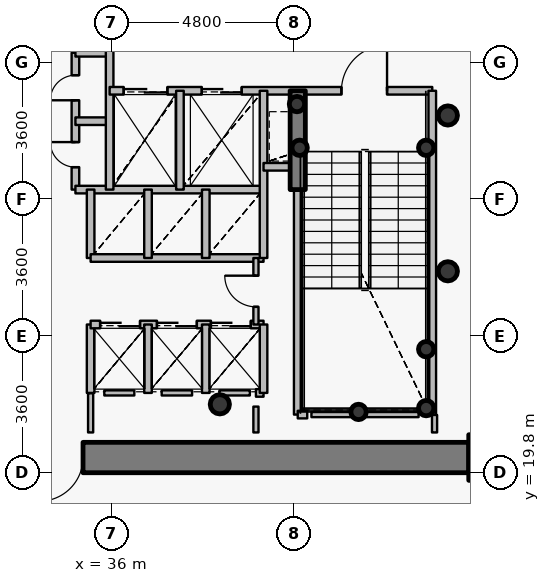
"""IFC4 building model, lengths in metres.
Left out: names, types, materials, properties, quantities, classifications, styles, units other than length and angle.
Written with IfcOpenShell. Run it as: python <this file> out.ifc"""

import sys

from ifc_helpers import new_model, si_unit, direction, frame, frame_2d, origin, origin_2d, place, context, subcontext, project, spatial, rectangle, hollow_circle, extrude, source, transform, mapped, element, fill, save


model = new_model("IFC4")
c1 = context("Model", 3, precision=1e-05, world=origin(), true_north=direction((0.0, 1.0)))
c2 = subcontext(c1, "Body", "Model", "MODEL_VIEW")
j1 = project(units=[si_unit("LENGTHUNIT", "METRE"), si_unit("PLANEANGLEUNIT", "RADIAN")], contexts=[c1])
p1 = place(None, origin())
s1 = spatial("IfcSite", under=j1, at=p1, CompositionType="ELEMENT")
p2 = place(p1, origin())
s2 = spatial("IfcBuilding", under=s1, at=p2, CompositionType="ELEMENT")
p3 = place(p2, frame((0.0, 0.0, 138.45)))
s3 = spatial("IfcBuildingStorey", under=s2, at=p3, CompositionType="ELEMENT", Elevation=138.45)
p4 = place(p3, frame((46.0, 20.2, 0.0), z_axis=(0.0, 0.0, 1.0), x_axis=(1.0, 0.0, 0.0)))
e1 = element("IfcColumn", 1, at=p4, inside=s3, PredefinedType="COLUMN", context=c2, shape_type="SweptSolid", body=[
    extrude(rectangle(XDim=1.2, YDim=1.2, at=origin_2d()), origin(), (0.0, 0.0, 1.0), 3.75),
])
p5 = place(p3, frame((38.85, 21.6, 0.0), z_axis=(0.0, 0.0, 1.0), x_axis=(1.0, 0.0, 0.0)))
e2 = element("IfcColumn", 2, at=p5, inside=s3, PredefinedType="COLUMN", context=c2, shape_type="SweptSolid", body=[
    extrude(hollow_circle(Radius=0.254, WallThickness=0.02, at=origin_2d()), origin(), (0.0, 0.0, 1.0), 3.75),
])
for number, where, z_axis, x_axis in (
    (3, (44.28, 21.5, 0.0), (0.0, 0.0, 1.0), (1.0, 0.0, 0.0)),
    (4, (44.28, 23.05, 0.0), (0.0, 0.0, 1.0), (1.0, 0.0, 0.0)),
    (5, (42.5, 21.4, 0.0), (0.0, 0.0, 1.0), (1.0, 0.0, 0.0)),
    (6, (40.95, 28.35, 0.0), (0.0, 0.0, 1.0), (1.0, 0.0, 0.0)),
    (7, (44.28, 28.35, 0.0), (0.0, 0.0, 1.0), (1.0, 0.0, 0.0)),
    (8, (40.88, 29.5, 0.0), (0.0, 0.0, 1.0), (1.0, 0.0, 0.0)),
):
    element("IfcColumn", number, at=place(p3, frame(where, z_axis=z_axis, x_axis=x_axis)), inside=s3, PredefinedType="COLUMN", context=c2, shape_type="SweptSolid", body=[
        extrude(hollow_circle(Radius=0.203, WallThickness=0.016, at=origin_2d()), origin(), (0.0, 0.0, 1.0), 3.75),
    ])
p6 = place(p3, frame((45.4, 20.2, 0.0), z_axis=(0.0, 0.0, 1.0), x_axis=(-1.0, 0.0, 0.0)))
e9 = element("IfcWall", 9, at=p6, inside=s3, PredefinedType="SHEAR", context=c2, shape_type="SweptSolid", body=[
    extrude(rectangle(XDim=18.8, YDim=0.8, at=frame_2d((9.4, 0.0))), origin(), (0.0, 0.0, 1.0), 2.95),
])
p7 = place(p6, frame((10.15, 0.0, 0.0)))
e10 = element("IfcOpeningElement", 10, at=p7, cuts=e9, PredefinedType="OPENING", context=c2, shape_type="SweptSolid", body=[
    extrude(rectangle(XDim=1.15, YDim=2.15, at=origin_2d()), frame((0.575, 0.41, 1.075), z_axis=(0.0, -1.0, 0.0), x_axis=(1.0, 0.0, 0.0)), (0.0, 0.0, 1.0), 0.82),
])
p8 = place(p3, frame((40.9, 27.25, 0.0), z_axis=(0.0, 0.0, 1.0), x_axis=(0.0, 1.0, 0.0)))
e11 = element("IfcWall", 11, at=p8, inside=s3, PredefinedType="SHEAR", context=c2, shape_type="SweptSolid", body=[
    extrude(rectangle(XDim=2.6, YDim=0.4, at=frame_2d((1.3, 0.0))), origin(), (0.0, 0.0, 1.0), 3.1),
])
for number, where, z_axis, x_axis in (
    (12, (44.85, 25.1, 0.0), (0.0, 0.0, 1.0), (1.0, 0.0, 0.0)),
    (13, (44.85, 29.2, 0.0), (0.0, 0.0, 1.0), (1.0, 0.0, 0.0)),
):
    element("IfcColumn", number, at=place(p3, frame(where, z_axis=z_axis, x_axis=x_axis)), inside=s3, PredefinedType="COLUMN", context=c2, shape_type="SweptSolid", body=[
        extrude(hollow_circle(Radius=0.254, WallThickness=0.02, at=origin_2d()), origin(), (0.0, 0.0, 1.0), 3.75),
    ])
p9 = place(p3, frame((35.05, 27.25, 0.0), z_axis=(0.0, 0.0, 1.0), x_axis=(0.0, 1.0, 0.0)))
e14 = element("IfcWall", 14, at=p9, inside=s3, PredefinedType="PARTITIONING", context=c2, shape_type="SweptSolid", body=[
    extrude(rectangle(XDim=3.6, YDim=0.2, at=frame_2d((1.8, 0.0))), origin(), (0.0, 0.0, 1.0), 3.5),
])
p10 = place(p9, frame((0.59, 0.0, 0.0)))
e15 = element("IfcOpeningElement", 15, at=p10, cuts=e14, PredefinedType="OPENING", context=c2, shape_type="SweptSolid", body=[
    extrude(rectangle(XDim=0.66, YDim=2.05, at=origin_2d()), frame((0.33, 0.11, 1.025), z_axis=(0.0, -1.0, 0.0), x_axis=(1.0, 0.0, 0.0)), (0.0, 0.0, 1.0), 0.22),
])
p11 = place(p9, frame((2.35, 0.0, 0.0)))
e16 = element("IfcOpeningElement", 16, at=p11, cuts=e14, PredefinedType="OPENING", context=c2, shape_type="SweptSolid", body=[
    extrude(rectangle(XDim=0.66, YDim=2.05, at=origin_2d()), frame((0.33, 0.11, 1.025), z_axis=(0.0, -1.0, 0.0), x_axis=(1.0, 0.0, 0.0)), (0.0, 0.0, 1.0), 0.22),
])
p12 = place(p3, frame((35.05, 27.25, 0.0), z_axis=(0.0, 0.0, 1.0), x_axis=(1.0, 0.0, 0.0)))
e17 = element("IfcWall", 17, at=p12, inside=s3, PredefinedType="PARTITIONING", context=c2, shape_type="SweptSolid", body=[
    extrude(rectangle(XDim=4.95, YDim=0.2, at=frame_2d((2.475, 0.0))), origin(), (0.0, 0.0, 1.0), 3.085),
])
for number, where, z_axis, x_axis in (
    (18, (35.05, 29.05, 0.0), (0.0, 0.0, 1.0), (1.0, 0.0, 0.0)),
    (19, (35.05, 30.85, 0.0), (0.0, 0.0, 1.0), (1.0, 0.0, 0.0)),
):
    element("IfcWall", number, at=place(p3, frame(where, z_axis=z_axis, x_axis=x_axis)), inside=s3, PredefinedType="PARTITIONING", context=c2, shape_type="SweptSolid", body=[
        extrude(rectangle(XDim=0.9, YDim=0.2, at=frame_2d((0.45, 0.0))), origin(), (0.0, 0.0, 1.0), 3.5),
    ])
p13 = place(p3, frame((35.45, 21.9, 0.0), z_axis=(0.0, 0.0, 1.0), x_axis=(0.0, 1.0, 0.0)))
e20 = element("IfcWall", 20, at=p13, inside=s3, PredefinedType="PARTITIONING", context=c2, shape_type="SweptSolid", body=[
    extrude(rectangle(XDim=1.8, YDim=0.2, at=frame_2d((0.9, 0.0))), origin(), (0.0, 0.0, 1.0), 3.5),
])
p14 = place(p3, frame((35.45, 23.7, 0.0), z_axis=(0.0, 0.0, 1.0), x_axis=(1.0, 0.0, 0.0)))
e21 = element("IfcWall", 21, at=p14, inside=s3, PredefinedType="PARTITIONING", context=c2, shape_type="SweptSolid", body=[
    extrude(rectangle(XDim=4.55, YDim=0.2, at=frame_2d((2.275, 0.0))), origin(), (0.0, 0.0, 1.0), 3.085),
])
p15 = place(p14, frame((0.25, 0.0, 0.0)))
e22 = element("IfcOpeningElement", 22, at=p15, cuts=e21, PredefinedType="OPENING", context=c2, shape_type="SweptSolid", body=[
    extrude(rectangle(XDim=1.05, YDim=2.15, at=origin_2d()), frame((0.525, 0.11, 1.075), z_axis=(0.0, -1.0, 0.0), x_axis=(1.0, 0.0, 0.0)), (0.0, 0.0, 1.0), 0.22),
])
p16 = place(p14, frame((1.745, 0.0, 0.0)))
e23 = element("IfcOpeningElement", 23, at=p16, cuts=e21, PredefinedType="OPENING", context=c2, shape_type="SweptSolid", body=[
    extrude(rectangle(XDim=1.05, YDim=2.15, at=origin_2d()), frame((0.525, 0.11, 1.075), z_axis=(0.0, -1.0, 0.0), x_axis=(1.0, 0.0, 0.0)), (0.0, 0.0, 1.0), 0.22),
])
p17 = place(p14, frame((3.165, 0.0, 0.0)))
e24 = element("IfcOpeningElement", 24, at=p17, cuts=e21, PredefinedType="OPENING", context=c2, shape_type="SweptSolid", body=[
    extrude(rectangle(XDim=1.05, YDim=2.15, at=origin_2d()), frame((0.525, 0.11, 1.075), z_axis=(0.0, -1.0, 0.0), x_axis=(1.0, 0.0, 0.0)), (0.0, 0.0, 1.0), 0.22),
])
p18 = place(p3, frame((35.45, 25.45, 0.0), z_axis=(0.0, 0.0, 1.0), x_axis=(0.0, 1.0, 0.0)))
e25 = element("IfcWall", 25, at=p18, inside=s3, PredefinedType="PARTITIONING", context=c2, shape_type="SweptSolid", body=[
    extrude(rectangle(XDim=1.8, YDim=0.2, at=frame_2d((0.9, 0.0))), origin(), (0.0, 0.0, 1.0), 3.5),
])
p19 = place(p3, frame((35.45, 25.45, 0.0), z_axis=(0.0, 0.0, 1.0), x_axis=(1.0, 0.0, 0.0)))
e26 = element("IfcWall", 26, at=p19, inside=s3, PredefinedType="PARTITIONING", context=c2, shape_type="SweptSolid", body=[
    extrude(rectangle(XDim=4.55, YDim=0.2, at=frame_2d((2.275, 0.0))), origin(), (0.0, 0.0, 1.0), 3.085),
])
p20 = place(p3, frame((35.95, 27.25, 0.0), z_axis=(0.0, 0.0, 1.0), x_axis=(0.0, 1.0, 0.0)))
e27 = element("IfcWall", 27, at=p20, inside=s3, PredefinedType="PARTITIONING", context=c2, shape_type="SweptSolid", body=[
    extrude(rectangle(XDim=3.8, YDim=0.2, at=frame_2d((1.9, 0.0))), origin(), (0.0, 0.0, 1.0), 3.5),
])
p21 = place(p3, frame((35.95, 29.85, 0.0), z_axis=(0.0, 0.0, 1.0), x_axis=(1.0, 0.0, 0.0)))
e28 = element("IfcWall", 28, at=p21, inside=s3, PredefinedType="PARTITIONING", context=c2, shape_type="SweptSolid", body=[
    extrude(rectangle(XDim=8.49, YDim=0.2, at=frame_2d((4.245, 0.0))), origin(), (0.0, 0.0, 1.0), 3.085),
])
p22 = place(p21, frame((6.1, 0.0, 0.0)))
e29 = element("IfcOpeningElement", 29, at=p22, cuts=e28, PredefinedType="OPENING", context=c2, shape_type="SweptSolid", body=[
    extrude(rectangle(XDim=1.2, YDim=2.15, at=origin_2d()), frame((0.6, 0.11, 1.075), z_axis=(0.0, -1.0, 0.0), x_axis=(1.0, 0.0, 0.0)), (0.0, 0.0, 1.0), 0.22),
])
p23 = place(p21, frame((0.37, 0.0, 0.0)))
e30 = element("IfcOpeningElement", 30, at=p23, cuts=e28, PredefinedType="OPENING", context=c2, shape_type="SweptSolid", body=[
    extrude(rectangle(XDim=1.15, YDim=2.15, at=origin_2d()), frame((0.575, 0.11, 1.075), z_axis=(0.0, -1.0, 0.0), x_axis=(1.0, 0.0, 0.0)), (0.0, 0.0, 1.0), 0.22),
])
p24 = place(p21, frame((2.425, 0.0, 0.0)))
e31 = element("IfcOpeningElement", 31, at=p24, cuts=e28, PredefinedType="OPENING", context=c2, shape_type="SweptSolid", body=[
    extrude(rectangle(XDim=1.05, YDim=2.15, at=origin_2d()), frame((0.525, 0.11, 1.075), z_axis=(0.0, -1.0, 0.0), x_axis=(1.0, 0.0, 0.0)), (0.0, 0.0, 1.0), 0.22),
])
for number, where, z_axis, x_axis in (
    (32, (36.96, 21.9, 0.0), (0.0, 0.0, 1.0), (0.0, 1.0, 0.0)),
    (33, (36.96, 25.45, 0.0), (0.0, 0.0, 1.0), (0.0, 1.0, 0.0)),
):
    element("IfcWall", number, at=place(p3, frame(where, z_axis=z_axis, x_axis=x_axis)), inside=s3, PredefinedType="PARTITIONING", context=c2, shape_type="SweptSolid", body=[
        extrude(rectangle(XDim=1.8, YDim=0.2, at=frame_2d((0.9, 0.0))), origin(), (0.0, 0.0, 1.0), 3.5),
    ])
p25 = place(p3, frame((37.8, 27.25, 0.0), z_axis=(0.0, 0.0, 1.0), x_axis=(0.0, 1.0, 0.0)))
e34 = element("IfcWall", 34, at=p25, inside=s3, PredefinedType="PARTITIONING", context=c2, shape_type="SweptSolid", body=[
    extrude(rectangle(XDim=2.6, YDim=0.2, at=frame_2d((1.3, 0.0))), origin(), (0.0, 0.0, 1.0), 3.5),
])
for number, where, z_axis, x_axis in (
    (35, (38.48, 21.9, 0.0), (0.0, 0.0, 1.0), (0.0, 1.0, 0.0)),
    (36, (38.48, 25.45, 0.0), (0.0, 0.0, 1.0), (0.0, 1.0, 0.0)),
):
    element("IfcWall", number, at=place(p3, frame(where, z_axis=z_axis, x_axis=x_axis)), inside=s3, PredefinedType="PARTITIONING", context=c2, shape_type="SweptSolid", body=[
        extrude(rectangle(XDim=1.8, YDim=0.2, at=frame_2d((0.9, 0.0))), origin(), (0.0, 0.0, 1.0), 3.5),
    ])
p26 = place(p3, frame((39.8, 21.9, 0.0), z_axis=(0.0, 0.0, 1.0), x_axis=(1.0, 0.0, 0.0)))
e37 = element("IfcWall", 37, at=p26, inside=s3, PredefinedType="PARTITIONING", context=c2, shape_type="SweptSolid", body=[
    extrude(rectangle(XDim=0.2, YDim=0.2, at=frame_2d((0.1, 0.0))), origin(), (0.0, 0.0, 1.0), 3.5),
])
p27 = place(p3, frame((39.8, 23.7, 0.0), z_axis=(0.0, 0.0, 1.0), x_axis=(0.0, 1.0, 0.0)))
e38 = element("IfcWall", 38, at=p27, inside=s3, PredefinedType="PARTITIONING", context=c2, shape_type="SweptSolid", body=[
    extrude(rectangle(XDim=1.75, YDim=0.135, at=frame_2d((0.875, 0.0))), origin(), (0.0, 0.0, 1.0), 3.5),
])
p28 = place(p27, frame((0.465, 0.0, 0.0)))
e39 = element("IfcOpeningElement", 39, at=p28, cuts=e38, PredefinedType="OPENING", context=c2, shape_type="SweptSolid", body=[
    extrude(rectangle(XDim=0.82, YDim=2.1, at=origin_2d()), frame((0.41, 0.078, 1.05), z_axis=(0.0, -1.0, 0.0), x_axis=(1.0, 0.0, 0.0)), (0.0, 0.0, 1.0), 0.155),
])
p29 = place(p3, frame((40.0, 21.9, 0.0), z_axis=(0.0, 0.0, 1.0), x_axis=(0.0, 1.0, 0.0)))
e40 = element("IfcWall", 40, at=p29, inside=s3, PredefinedType="PARTITIONING", context=c2, shape_type="SweptSolid", body=[
    extrude(rectangle(XDim=1.8, YDim=0.2, at=frame_2d((0.9, 0.0))), origin(), (0.0, 0.0, 1.0), 3.5),
])
p30 = place(p3, frame((40.0, 25.45, 0.0), z_axis=(0.0, 0.0, 1.0), x_axis=(0.0, 1.0, 0.0)))
e41 = element("IfcWall", 41, at=p30, inside=s3, PredefinedType="PARTITIONING", context=c2, shape_type="SweptSolid", body=[
    extrude(rectangle(XDim=4.4, YDim=0.2, at=frame_2d((2.2, 0.0))), origin(), (0.0, 0.0, 1.0), 3.5),
])
p31 = place(p3, frame((40.0, 27.85, 0.0), z_axis=(0.0, 0.0, 1.0), x_axis=(1.0, 0.0, 0.0)))
e42 = element("IfcWall", 42, at=p31, inside=s3, PredefinedType="PARTITIONING", context=c2, shape_type="SweptSolid", body=[
    extrude(rectangle(XDim=0.9, YDim=0.2, at=frame_2d((0.45, 0.0))), origin(), (0.0, 0.0, 1.0), 3.5),
])
p32 = place(p3, frame((40.9, 21.33, 0.0), z_axis=(0.0, 0.0, 1.0), x_axis=(0.0, 1.0, 0.0)))
e43 = element("IfcWall", 43, at=p32, inside=s3, PredefinedType="PARTITIONING", context=c2, shape_type="SweptSolid", body=[
    extrude(rectangle(XDim=5.91, YDim=0.2, at=frame_2d((2.955, 0.0))), origin(), (0.0, 0.0, 1.0), 3.035),
])
p33 = place(p3, frame((40.9, 21.33, 0.0), z_axis=(0.0, 0.0, 1.0), x_axis=(1.0, 0.0, 0.0)))
e44 = element("IfcWall", 44, at=p33, inside=s3, PredefinedType="PARTITIONING", context=c2, shape_type="SweptSolid", body=[
    extrude(rectangle(XDim=0.25, YDim=0.2, at=frame_2d((0.125, 0.0))), origin(), (0.0, 0.0, 1.0), 3.035),
])
p34 = place(p3, frame((44.44, 21.33, 0.0), z_axis=(0.0, 0.0, 1.0), x_axis=(0.0, 1.0, 0.0)))
e45 = element("IfcWall", 45, at=p34, inside=s3, PredefinedType="PARTITIONING", context=c2, shape_type="SweptSolid", body=[
    extrude(rectangle(XDim=8.52, YDim=0.2, at=frame_2d((4.26, 0.0))), origin(), (0.0, 0.0, 1.0), 3.5),
])
p35 = place(p3, frame((44.08, 21.33, 0.0), z_axis=(0.0, 0.0, 1.0), x_axis=(-1.0, 0.0, 0.0)))
e46 = element("IfcWall", 46, at=p35, inside=s3, PredefinedType="PARTITIONING", context=c2, shape_type="SweptSolid", body=[
    extrude(rectangle(XDim=2.82, YDim=0.135, at=frame_2d((1.41, 0.0))), origin(), (0.0, 0.0, 1.0), 3.035),
])
p36 = place(p3, frame((36.6, 21.9, 0.0), z_axis=(0.0, 0.0, 1.0), x_axis=(-1.0, 0.0, 0.0)))
e47 = element("IfcWall", 47, at=p36, inside=s3, PredefinedType="PARTITIONING", context=c2, shape_type="SweptSolid", body=[
    extrude(rectangle(XDim=0.79, YDim=0.135, at=frame_2d((0.395, 0.0))), origin(), (0.0, 0.0, 1.0), 3.5),
])
p37 = place(p3, frame((38.12, 21.9, 0.0), z_axis=(0.0, 0.0, 1.0), x_axis=(-1.0, 0.0, 0.0)))
e48 = element("IfcWall", 48, at=p37, inside=s3, PredefinedType="PARTITIONING", context=c2, shape_type="SweptSolid", body=[
    extrude(rectangle(XDim=0.8, YDim=0.135, at=frame_2d((0.4, 0.0))), origin(), (0.0, 0.0, 1.0), 3.5),
])
p38 = place(p3, frame((39.64, 21.9, 0.0), z_axis=(0.0, 0.0, 1.0), x_axis=(-1.0, 0.0, 0.0)))
e49 = element("IfcWall", 49, at=p38, inside=s3, PredefinedType="PARTITIONING", context=c2, shape_type="SweptSolid", body=[
    extrude(rectangle(XDim=0.8, YDim=0.135, at=frame_2d((0.4, 0.0))), origin(), (0.0, 0.0, 1.0), 3.085),
])
p39 = place(p3, frame((39.8, 20.86, 0.0), z_axis=(0.0, 0.0, 1.0), x_axis=(0.0, 1.0, 0.0)))
e50 = element("IfcWall", 50, at=p39, inside=s3, PredefinedType="PARTITIONING", context=c2, shape_type="SweptSolid", body=[
    extrude(rectangle(XDim=0.68, YDim=0.135, at=frame_2d((0.34, 0.0))), origin(), (0.0, 0.0, 1.0), 3.035),
])
p40 = place(p3, frame((44.5, 20.86, 0.0), z_axis=(0.0, 0.0, 1.0), x_axis=(0.0, 1.0, 0.0)))
e51 = element("IfcWall", 51, at=p40, inside=s3, PredefinedType="PARTITIONING", context=c2, shape_type="SweptSolid", body=[
    extrude(rectangle(XDim=0.46, YDim=0.135, at=frame_2d((0.23, 0.0))), origin(), (0.0, 0.0, 1.0), 3.5),
])
p41 = place(p3, frame((35.45, 21.89, 0.0), z_axis=(0.0, 0.0, 1.0), x_axis=(0.0, -1.0, 0.0)))
e52 = element("IfcWall", 52, at=p41, inside=s3, PredefinedType="PARTITIONING", context=c2, shape_type="SweptSolid", body=[
    extrude(rectangle(XDim=1.03, YDim=0.135, at=frame_2d((0.515, 0.0))), origin(), (0.0, 0.0, 1.0), 3.085),
])
p42 = place(p3, frame((45.41, 19.8, 0.0), z_axis=(0.0, 0.0, 1.0), x_axis=(1.0, 0.0, 0.0)))
e53 = element("IfcWall", 53, at=p42, inside=s3, PredefinedType="PARTITIONING", context=c2, shape_type="SweptSolid", body=[
    extrude(rectangle(XDim=0.99, YDim=0.135, at=frame_2d((0.495, 0.0))), origin(), (0.0, 0.0, 1.0), 2.935),
])
m1 = source(origin(), c2, "Body", "SweptSolid", [
    extrude(rectangle(XDim=1.15, YDim=2.15, at=origin_2d()), frame((0.575, 0.025, 1.075), z_axis=(0.0, -1.0, 0.0), x_axis=(1.0, 0.0, 0.0)), (0.0, 0.0, 1.0), 0.05),
])
p43 = place(p7, origin())
e54 = element("IfcDoor", 54, at=p43, inside=s3, OperationType="SINGLE_SWING_RIGHT", PredefinedType="DOOR", context=c2, shape_type="MappedRepresentation", body=[
    mapped(m1, transform((0.0, 0.0, 0.0), x_axis=(1.0, 0.0, 0.0), y_axis=(0.0, 1.0, 0.0), z_axis=(0.0, 0.0, 1.0), scale=1.0)),
])
fill(e10, e54)
m2 = source(origin(), c2, "Body", "SweptSolid", [
    extrude(rectangle(XDim=1.2, YDim=2.15, at=origin_2d()), frame((0.6, 0.025, 1.075), z_axis=(0.0, -1.0, 0.0), x_axis=(1.0, 0.0, 0.0)), (0.0, 0.0, 1.0), 0.05),
])
p44 = place(p22, origin())
e55 = element("IfcDoor", 55, at=p44, inside=s3, OperationType="SINGLE_SWING_RIGHT", PredefinedType="DOOR", context=c2, shape_type="MappedRepresentation", body=[
    mapped(m2, transform((0.0, 0.0, 0.0), x_axis=(1.0, 0.0, 0.0), y_axis=(0.0, 1.0, 0.0), z_axis=(0.0, 0.0, 1.0), scale=1.0)),
])
fill(e29, e55)
m3 = source(origin(), c2, "Body", "SweptSolid", [
    extrude(rectangle(XDim=1.15, YDim=2.15, at=origin_2d()), frame((0.575, 0.025, 1.075), z_axis=(0.0, -1.0, 0.0), x_axis=(1.0, 0.0, 0.0)), (0.0, 0.0, 1.0), 0.05),
])
p45 = place(p23, origin())
e56 = element("IfcDoor", 56, at=p45, inside=s3, OperationType="DOUBLE_DOOR_SLIDING", PredefinedType="USERDEFINED", context=c2, shape_type="MappedRepresentation", body=[
    mapped(m3, transform((0.0, 0.0, 0.0), x_axis=(1.0, 0.0, 0.0), y_axis=(0.0, 1.0, 0.0), z_axis=(0.0, 0.0, 1.0), scale=1.0)),
])
fill(e30, e56)
m4 = source(origin(), c2, "Body", "SweptSolid", [
    extrude(rectangle(XDim=1.05, YDim=2.15, at=origin_2d()), frame((0.525, 0.025, 1.075), z_axis=(0.0, -1.0, 0.0), x_axis=(1.0, 0.0, 0.0)), (0.0, 0.0, 1.0), 0.05),
])
p46 = place(p24, origin())
e57 = element("IfcDoor", 57, at=p46, inside=s3, OperationType="DOUBLE_DOOR_SLIDING", PredefinedType="USERDEFINED", context=c2, shape_type="MappedRepresentation", body=[
    mapped(m4, transform((0.0, 0.0, 0.0), x_axis=(1.0, 0.0, 0.0), y_axis=(0.0, 1.0, 0.0), z_axis=(0.0, 0.0, 1.0), scale=1.0)),
])
fill(e31, e57)
p47 = place(p15, origin())
e58 = element("IfcDoor", 58, at=p47, inside=s3, OperationType="DOUBLE_DOOR_SLIDING", PredefinedType="USERDEFINED", context=c2, shape_type="MappedRepresentation", body=[
    mapped(m4, transform((0.0, 0.0, 0.0), x_axis=(1.0, 0.0, 0.0), y_axis=(0.0, 1.0, 0.0), z_axis=(0.0, 0.0, 1.0), scale=1.0)),
])
fill(e22, e58)
p48 = place(p16, origin())
e59 = element("IfcDoor", 59, at=p48, inside=s3, OperationType="DOUBLE_DOOR_SLIDING", PredefinedType="USERDEFINED", context=c2, shape_type="MappedRepresentation", body=[
    mapped(m4, transform((0.0, 0.0, 0.0), x_axis=(1.0, 0.0, 0.0), y_axis=(0.0, 1.0, 0.0), z_axis=(0.0, 0.0, 1.0), scale=1.0)),
])
fill(e23, e59)
p49 = place(p17, origin())
e60 = element("IfcDoor", 60, at=p49, inside=s3, OperationType="DOUBLE_DOOR_SLIDING", PredefinedType="USERDEFINED", context=c2, shape_type="MappedRepresentation", body=[
    mapped(m4, transform((0.0, 0.0, 0.0), x_axis=(1.0, 0.0, 0.0), y_axis=(0.0, 1.0, 0.0), z_axis=(0.0, 0.0, 1.0), scale=1.0)),
])
fill(e24, e60)
m5 = source(origin(), c2, "Body", "SweptSolid", [
    extrude(rectangle(XDim=0.66, YDim=2.05, at=origin_2d()), frame((0.33, 0.025, 1.025), z_axis=(0.0, -1.0, 0.0), x_axis=(1.0, 0.0, 0.0)), (0.0, 0.0, 1.0), 0.05),
])
p50 = place(p10, origin())
e61 = element("IfcDoor", 61, at=p50, inside=s3, OperationType="SINGLE_SWING_RIGHT", PredefinedType="USERDEFINED", context=c2, shape_type="MappedRepresentation", body=[
    mapped(m5, transform((0.0, 0.0, 0.0), x_axis=(1.0, 0.0, 0.0), y_axis=(0.0, 1.0, 0.0), z_axis=(0.0, 0.0, 1.0), scale=1.0)),
])
fill(e15, e61)
p51 = place(p11, origin())
e62 = element("IfcDoor", 62, at=p51, inside=s3, OperationType="SINGLE_SWING_LEFT", PredefinedType="USERDEFINED", context=c2, shape_type="MappedRepresentation", body=[
    mapped(m5, transform((0.0, 0.0, 0.0), x_axis=(1.0, 0.0, 0.0), y_axis=(0.0, 1.0, 0.0), z_axis=(0.0, 0.0, 1.0), scale=1.0)),
])
fill(e16, e62)
m6 = source(origin(), c2, "Body", "SweptSolid", [
    extrude(rectangle(XDim=0.82, YDim=2.1, at=origin_2d()), frame((0.41, 0.025, 1.05), z_axis=(0.0, -1.0, 0.0), x_axis=(1.0, 0.0, 0.0)), (0.0, 0.0, 1.0), 0.05),
])
p52 = place(p28, origin())
e63 = element("IfcDoor", 63, at=p52, inside=s3, OperationType="SINGLE_SWING_RIGHT", PredefinedType="DOOR", context=c2, shape_type="MappedRepresentation", body=[
    mapped(m6, transform((0.0, 0.0, 0.0), x_axis=(1.0, 0.0, 0.0), y_axis=(0.0, 1.0, 0.0), z_axis=(0.0, 0.0, 1.0), scale=1.0)),
])
fill(e39, e63)
save(model, sys.argv[1])
